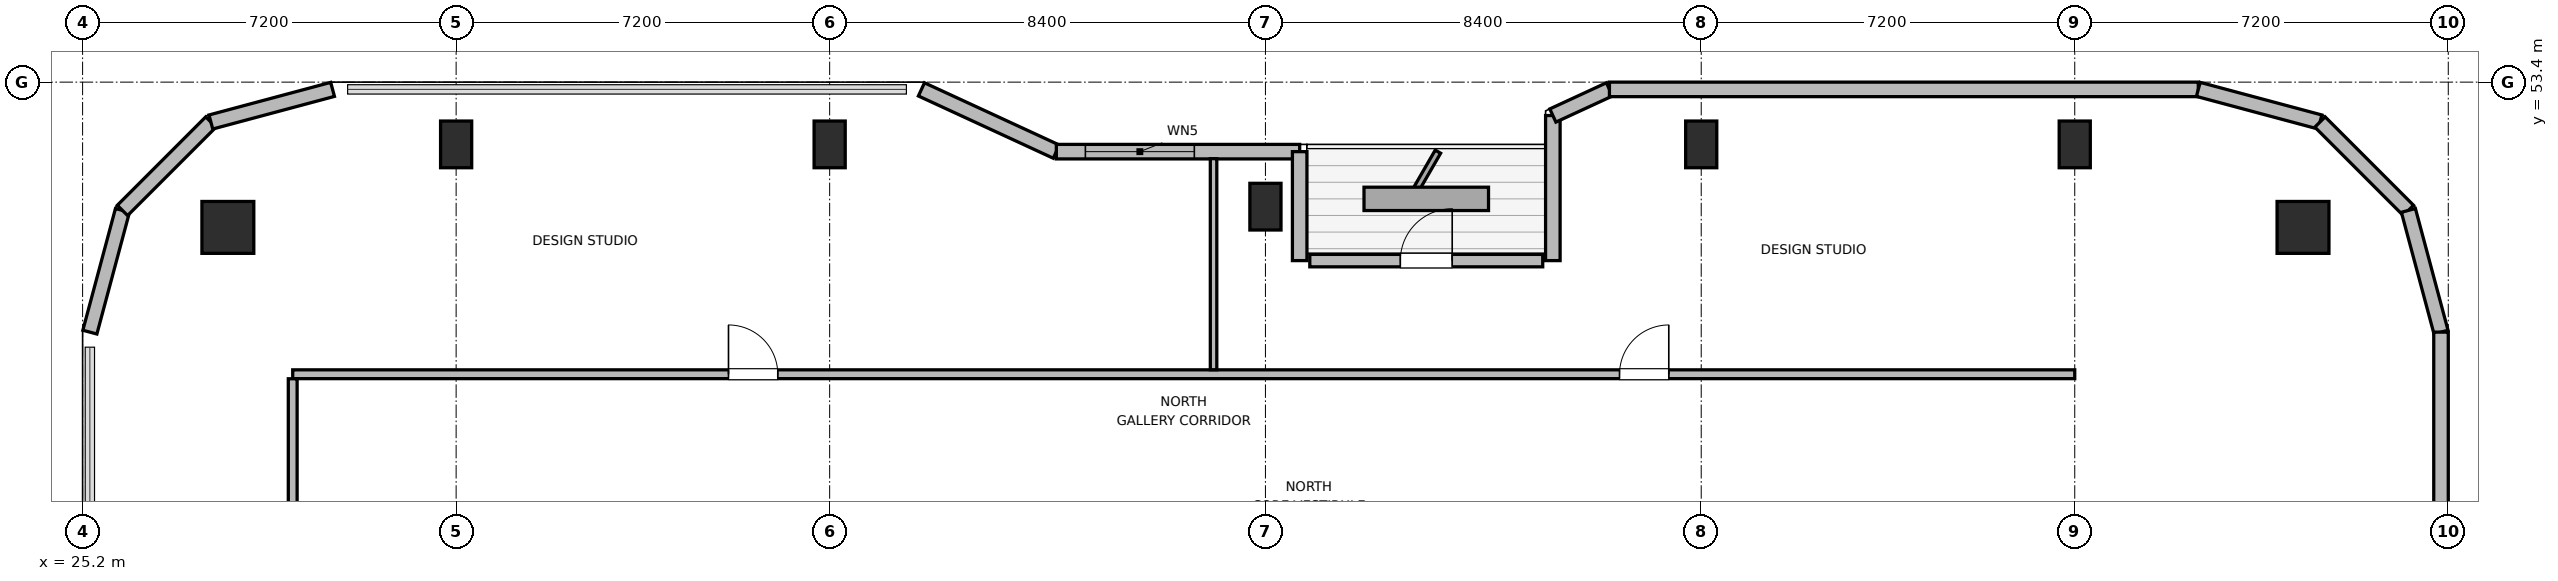
"""IFC4 building model, lengths in metres.
Left out: names, types, materials, properties, quantities, classifications, styles, units other than length and angle.
Written with IfcOpenShell. Run it as: python <this file> out.ifc"""

import sys

from ifc_helpers import new_model, si_unit, direction, frame, frame_2d, origin, origin_2d, place, context, subcontext, project, spatial, rectangle, circle, extrude, element, fill, save


model = new_model("IFC4")
c1 = context("Model", 3, precision=1e-05, world=origin(), true_north=direction((0.0, 1.0)))
c2 = subcontext(c1, "Body", "Model", "MODEL_VIEW")
j1 = project(units=[si_unit("LENGTHUNIT", "METRE"), si_unit("PLANEANGLEUNIT", "RADIAN")], contexts=[c1])
p1 = place(None, origin())
s1 = spatial("IfcSite", under=j1, at=p1, CompositionType="ELEMENT")
p2 = place(p1, origin())
s2 = spatial("IfcBuilding", under=s1, at=p2, CompositionType="ELEMENT")
p3 = place(p2, frame((0.0, 0.0, 290.1)))
s3 = spatial("IfcBuildingStorey", under=s2, at=p3, CompositionType="ELEMENT", Elevation=290.1)
for number, where, z_axis, x_axis in (
    (1, (68.0, 50.6, 0.0), (0.0, 0.0, 1.0), (1.0, 0.0, 0.0)),
    (2, (28.0, 50.6, 0.0), (0.0, 0.0, 1.0), (1.0, 0.0, 0.0)),
):
    element("IfcColumn", number, at=place(p3, frame(where, z_axis=z_axis, x_axis=x_axis)), inside=s3, PredefinedType="COLUMN", context=c2, shape_type="SweptSolid", body=[
        extrude(circle(Radius=0.5, at=origin_2d()), origin(), (0.0, 0.0, 1.0), 3.9),
    ])
for number, where, z_axis, x_axis in (
    (3, (32.4, 52.2, 0.0), (0.0, 0.0, 1.0), (1.0, 0.0, 0.0)),
    (4, (39.6, 52.2, 0.0), (0.0, 0.0, 1.0), (1.0, 0.0, 0.0)),
    (5, (48.0, 51.0, 0.0), (0.0, 0.0, 1.0), (1.0, 0.0, 0.0)),
    (6, (56.4, 52.2, 0.0), (0.0, 0.0, 1.0), (1.0, 0.0, 0.0)),
    (7, (63.6, 52.2, 0.0), (0.0, 0.0, 1.0), (1.0, 0.0, 0.0)),
):
    element("IfcColumn", number, at=place(p3, frame(where, z_axis=z_axis, x_axis=x_axis)), inside=s3, PredefinedType="COLUMN", context=c2, shape_type="SweptSolid", body=[
        extrude(rectangle(XDim=0.6, YDim=0.9, at=origin_2d()), origin(), (0.0, 0.0, 1.0), 3.9),
    ])
p4 = place(p3, frame((25.34, 48.582, 0.0), z_axis=(0.0, 0.0, 1.0), x_axis=(0.258751159445, 0.965944013639, 0.0)))
e8 = element("IfcWall", 8, at=p4, inside=s3, PredefinedType="SOLIDWALL", context=c2, shape_type="SweptSolid", body=[
    extrude(rectangle(XDim=2.429, YDim=0.28, at=frame_2d((1.214, 0.0))), origin(), (0.0, 0.0, 1.0), 3.68),
])
p5 = place(p3, frame((25.969, 50.927, 0.0), z_axis=(0.0, 0.0, 1.0), x_axis=(0.707106781187, 0.707106781187, 0.0)))
e9 = element("IfcWall", 9, at=p5, inside=s3, PredefinedType="SOLIDWALL", context=c2, shape_type="SweptSolid", body=[
    extrude(rectangle(XDim=2.41, YDim=0.28, at=frame_2d((1.205, 0.0))), origin(), (0.0, 0.0, 1.0), 3.68),
])
p6 = place(p3, frame((27.673, 52.632, 0.0), z_axis=(0.0, 0.0, 1.0), x_axis=(0.965937282298, 0.25877628691, 0.0)))
e10 = element("IfcWall", 10, at=p6, inside=s3, PredefinedType="SOLIDWALL", context=c2, shape_type="SweptSolid", body=[
    extrude(rectangle(XDim=2.428, YDim=0.28, at=frame_2d((1.214, 0.0))), origin(), (0.0, 0.0, 1.0), 3.68),
])
p7 = place(p3, frame((41.369, 53.26, 0.0), z_axis=(0.0, 0.0, 1.0), x_axis=(0.907956889006, -0.419063584324, 0.0)))
e11 = element("IfcWall", 11, at=p7, inside=s3, PredefinedType="SOLIDWALL", context=c2, shape_type="SweptSolid", body=[
    extrude(rectangle(XDim=2.864, YDim=0.28, at=frame_2d((1.432, 0.0))), origin(), (0.0, 0.0, 1.0), 2.265),
])
p8 = place(p3, frame((43.969, 52.06, 0.0), z_axis=(0.0, 0.0, 1.0), x_axis=(1.0, 0.0, 0.0)))
e12 = element("IfcWall", 12, at=p8, inside=s3, PredefinedType="SOLIDWALL", context=c2, shape_type="SweptSolid", body=[
    extrude(rectangle(XDim=4.691, YDim=0.28, at=frame_2d((2.345, 0.0))), origin(), (0.0, 0.0, 1.0), 2.265),
])
p9 = place(p8, frame((0.56, 0.0, 0.85)))
e13 = element("IfcOpeningElement", 13, at=p9, cuts=e12, PredefinedType="OPENING", context=c2, shape_type="SweptSolid", body=[
    extrude(rectangle(XDim=2.1, YDim=1.05, at=frame_2d((1.05, 0.525))), frame((0.0, 0.15, 0.0), z_axis=(0.0, -1.0, 0.0), x_axis=(1.0, 0.0, 0.0)), (0.0, 0.0, 1.0), 0.3),
])
p10 = place(p3, frame((48.66, 52.06, 0.0), z_axis=(0.0, 0.0, 1.0), x_axis=(0.0, -1.0, 0.0)))
e14 = element("IfcWall", 14, at=p10, inside=s3, PredefinedType="SOLIDWALL", context=c2, shape_type="SweptSolid", body=[
    extrude(rectangle(XDim=2.1, YDim=0.28, at=frame_2d((1.05, 0.0))), origin(), (0.0, 0.0, 1.0), 2.265),
])
p11 = place(p3, frame((48.855, 49.96, 0.0), z_axis=(0.0, 0.0, 1.0), x_axis=(1.0, 0.0, 0.0)))
e15 = element("IfcWall", 15, at=p11, inside=s3, PredefinedType="SOLIDWALL", context=c2, shape_type="SweptSolid", body=[
    extrude(rectangle(XDim=4.49, YDim=0.24, at=frame_2d((2.245, 0.0))), origin(), (0.0, 0.0, 1.0), 3.68),
])
p12 = place(p11, frame((1.745, 0.0, 0.0)))
e16 = element("IfcOpeningElement", 16, at=p12, cuts=e15, PredefinedType="OPENING", context=c2, shape_type="SweptSolid", body=[
    extrude(rectangle(XDim=1.0, YDim=2.02, at=frame_2d((0.5, 1.01))), frame((0.0, 0.13, 0.0), z_axis=(0.0, -1.0, 0.0), x_axis=(1.0, 0.0, 0.0)), (0.0, 0.0, 1.0), 0.26),
])
p13 = place(p3, frame((53.54, 49.96, 0.0), z_axis=(0.0, 0.0, 1.0), x_axis=(0.0, 1.0, 0.0)))
e17 = element("IfcWall", 17, at=p13, inside=s3, PredefinedType="SOLIDWALL", context=c2, shape_type="SweptSolid", body=[
    extrude(rectangle(XDim=2.796, YDim=0.28, at=frame_2d((1.398, 0.0))), origin(), (0.0, 0.0, 1.0), 2.265),
])
p14 = place(p3, frame((53.54, 52.756, 0.0), z_axis=(0.0, 0.0, 1.0), x_axis=(0.907893953211, 0.419199916176, 0.0)))
e18 = element("IfcWall", 18, at=p14, inside=s3, PredefinedType="SOLIDWALL", context=c2, shape_type="SweptSolid", body=[
    extrude(rectangle(XDim=1.201, YDim=0.28, at=frame_2d((0.601, 0.0))), origin(), (0.0, 0.0, 1.0), 3.68),
])
p15 = place(p3, frame((54.631, 53.26, 0.0), z_axis=(0.0, 0.0, 1.0), x_axis=(1.0, 0.0, 0.0)))
e19 = element("IfcWall", 19, at=p15, inside=s3, PredefinedType="SOLIDWALL", context=c2, shape_type="SweptSolid", body=[
    extrude(rectangle(XDim=11.351, YDim=0.28, at=frame_2d((5.675, 0.0))), origin(), (0.0, 0.0, 1.0), 3.68),
])
p16 = place(p3, frame((65.982, 53.26, 0.0), z_axis=(0.0, 0.0, 1.0), x_axis=(0.965937282298, -0.25877628691, 0.0)))
e20 = element("IfcWall", 20, at=p16, inside=s3, PredefinedType="SOLIDWALL", context=c2, shape_type="SweptSolid", body=[
    extrude(rectangle(XDim=2.428, YDim=0.28, at=frame_2d((1.214, 0.0))), origin(), (0.0, 0.0, 1.0), 3.68),
])
p17 = place(p3, frame((68.327, 52.632, 0.0), z_axis=(0.0, 0.0, 1.0), x_axis=(0.707106781187, -0.707106781187, 0.0)))
e21 = element("IfcWall", 21, at=p17, inside=s3, PredefinedType="SOLIDWALL", context=c2, shape_type="SweptSolid", body=[
    extrude(rectangle(XDim=2.41, YDim=0.28, at=frame_2d((1.205, 0.0))), origin(), (0.0, 0.0, 1.0), 3.68),
])
p18 = place(p3, frame((70.031, 50.927, 0.0), z_axis=(0.0, 0.0, 1.0), x_axis=(0.258751159445, -0.965944013639, 0.0)))
e22 = element("IfcWall", 22, at=p18, inside=s3, PredefinedType="SOLIDWALL", context=c2, shape_type="SweptSolid", body=[
    extrude(rectangle(XDim=2.429, YDim=0.28, at=frame_2d((1.214, 0.0))), origin(), (0.0, 0.0, 1.0), 3.68),
])
p19 = place(p3, frame((70.66, 48.582, 0.0), z_axis=(0.0, 0.0, 1.0), x_axis=(0.0, -1.0, 0.0)))
e23 = element("IfcWall", 23, at=p19, inside=s3, PredefinedType="SOLIDWALL", context=c2, shape_type="SweptSolid", body=[
    extrude(rectangle(XDim=5.842, YDim=0.28, at=frame_2d((2.921, 0.0))), origin(), (0.0, 0.0, 1.0), 3.68),
])
p20 = place(p3, frame((29.25, 47.77, 0.0), z_axis=(0.0, 0.0, 1.0), x_axis=(1.0, 0.0, 0.0)))
e24 = element("IfcWall", 24, at=p20, inside=s3, PredefinedType="PARTITIONING", context=c2, shape_type="SweptSolid", body=[
    extrude(rectangle(XDim=34.35, YDim=0.17, at=frame_2d((17.175, 0.0))), origin(), (0.0, 0.0, 1.0), 3.68),
])
p21 = place(p20, frame((8.4, 0.0, 0.0)))
e25 = element("IfcOpeningElement", 25, at=p21, cuts=e24, PredefinedType="OPENING", context=c2, shape_type="SweptSolid", body=[
    extrude(rectangle(XDim=0.95, YDim=2.04, at=frame_2d((0.475, 1.02))), frame((0.0, 0.095, 0.0), z_axis=(0.0, -1.0, 0.0), x_axis=(1.0, 0.0, 0.0)), (0.0, 0.0, 1.0), 0.19),
])
p22 = place(p20, frame((25.575, 0.0, 0.0)))
e26 = element("IfcOpeningElement", 26, at=p22, cuts=e24, PredefinedType="OPENING", context=c2, shape_type="SweptSolid", body=[
    extrude(rectangle(XDim=0.95, YDim=2.04, at=frame_2d((0.475, 1.02))), frame((0.0, 0.095, 0.0), z_axis=(0.0, -1.0, 0.0), x_axis=(1.0, 0.0, 0.0)), (0.0, 0.0, 1.0), 0.19),
])
p23 = place(p3, frame((29.25, 24.317, 0.0), z_axis=(0.0, 0.0, 1.0), x_axis=(0.0, 1.0, 0.0)))
e27 = element("IfcWall", 27, at=p23, inside=s3, PredefinedType="PARTITIONING", context=c2, shape_type="SweptSolid", body=[
    extrude(rectangle(XDim=23.366, YDim=0.17, at=frame_2d((11.683, 0.0))), origin(), (0.0, 0.0, 1.0), 3.68),
])
p24 = place(p23, frame((4.923, 0.0, 0.0)))
e28 = element("IfcOpeningElement", 28, at=p24, cuts=e27, PredefinedType="OPENING", context=c2, shape_type="SweptSolid", body=[
    extrude(rectangle(XDim=0.95, YDim=2.04, at=frame_2d((0.475, 1.02))), frame((0.0, 0.095, 0.0), z_axis=(0.0, -1.0, 0.0), x_axis=(1.0, 0.0, 0.0)), (0.0, 0.0, 1.0), 0.19),
])
p25 = place(p23, frame((16.693, 0.0, 0.0)))
e29 = element("IfcOpeningElement", 29, at=p25, cuts=e27, PredefinedType="OPENING", context=c2, shape_type="SweptSolid", body=[
    extrude(rectangle(XDim=0.95, YDim=2.04, at=frame_2d((0.475, 1.02))), frame((0.0, 0.095, 0.0), z_axis=(0.0, -1.0, 0.0), x_axis=(1.0, 0.0, 0.0)), (0.0, 0.0, 1.0), 0.19),
])
p26 = place(p3, frame((47.0, 47.857, 0.0), z_axis=(0.0, 0.0, 1.0), x_axis=(0.0, 1.0, 0.0)))
e30 = element("IfcWall", 30, at=p26, inside=s3, PredefinedType="PARTITIONING", context=c2, shape_type="SweptSolid", body=[
    extrude(rectangle(XDim=4.068, YDim=0.125, at=frame_2d((2.034, 0.0))), origin(), (0.0, 0.0, 1.0), 3.68),
])
p27 = place(p9, origin())
e31 = element("IfcWindow", 31, at=p27, inside=s3, PartitioningType="SINGLE_PANEL", PredefinedType="WINDOW", context=c2, shape_type="SweptSolid", body=[
    extrude(rectangle(XDim=2.1, YDim=1.05, at=frame_2d((1.05, 0.525))), frame((0.0, 0.03, 0.0), z_axis=(0.0, -1.0, 0.0), x_axis=(1.0, 0.0, 0.0)), (0.0, 0.0, 1.0), 0.06),
])
fill(e13, e31)
p28 = place(p12, origin())
e32 = element("IfcDoor", 32, at=p28, inside=s3, OperationType="SINGLE_SWING_RIGHT", PredefinedType="DOOR", context=c2, shape_type="SweptSolid", body=[
    extrude(rectangle(XDim=1.0, YDim=2.02, at=frame_2d((0.5, 1.01))), frame((0.0, 0.025, 0.0), z_axis=(0.0, -1.0, 0.0), x_axis=(1.0, 0.0, 0.0)), (0.0, 0.0, 1.0), 0.05),
])
fill(e16, e32)
p29 = place(p21, origin())
e33 = element("IfcDoor", 33, at=p29, inside=s3, OperationType="SINGLE_SWING_LEFT", PredefinedType="DOOR", context=c2, shape_type="SweptSolid", body=[
    extrude(rectangle(XDim=0.95, YDim=2.04, at=frame_2d((0.475, 1.02))), frame((0.0, 0.025, 0.0), z_axis=(0.0, -1.0, 0.0), x_axis=(1.0, 0.0, 0.0)), (0.0, 0.0, 1.0), 0.05),
])
fill(e25, e33)
p30 = place(p22, origin())
e34 = element("IfcDoor", 34, at=p30, inside=s3, OperationType="SINGLE_SWING_RIGHT", PredefinedType="DOOR", context=c2, shape_type="SweptSolid", body=[
    extrude(rectangle(XDim=0.95, YDim=2.04, at=frame_2d((0.475, 1.02))), frame((0.0, 0.025, 0.0), z_axis=(0.0, -1.0, 0.0), x_axis=(1.0, 0.0, 0.0)), (0.0, 0.0, 1.0), 0.05),
])
fill(e26, e34)
save(model, sys.argv[1])
